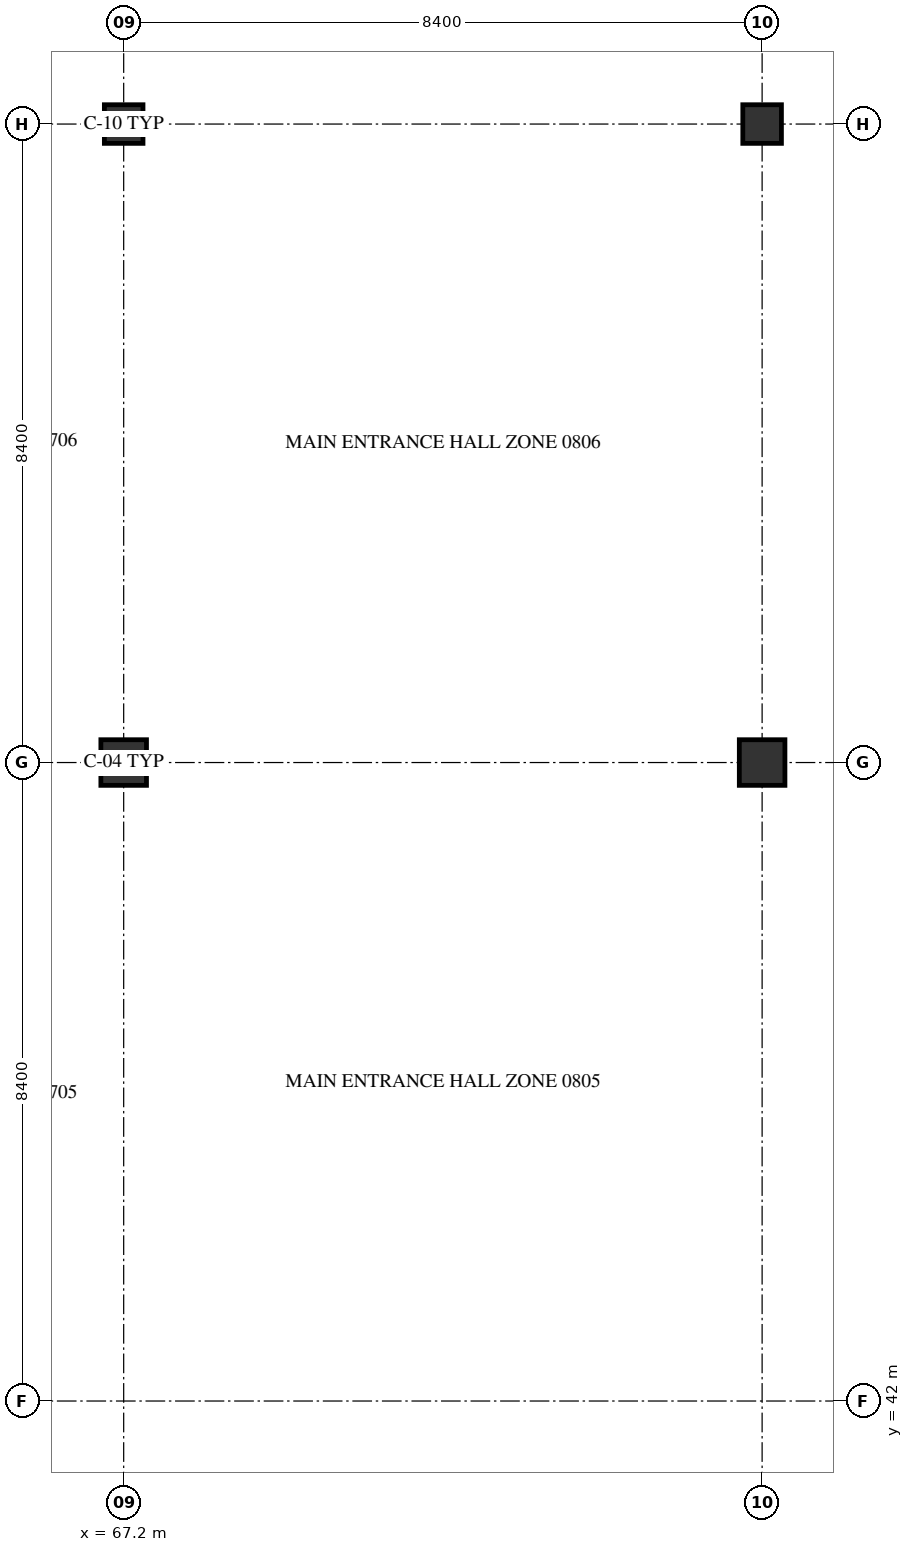
"""IFC4 building model, lengths in metres.
Left out: names, types, materials, properties, quantities, classifications, styles, units other than length and angle.
Written with IfcOpenShell. Run it as: python <this file> out.ifc"""

import sys

from ifc_helpers import new_model, si_unit, direction, frame, origin, origin_2d, place, context, subcontext, project, spatial, rectangle, hollow_circle, extrude, element, save


model = new_model("IFC4")
c1 = context("Model", 3, precision=1e-05, world=origin(), true_north=direction((0.0, 1.0)))
c2 = subcontext(c1, "Body", "Model", "MODEL_VIEW")
j1 = project(units=[si_unit("LENGTHUNIT", "METRE"), si_unit("PLANEANGLEUNIT", "RADIAN")], contexts=[c1])
p1 = place(None, origin())
s1 = spatial("IfcSite", under=j1, at=p1, CompositionType="ELEMENT")
p2 = place(p1, origin())
s2 = spatial("IfcBuilding", under=s1, at=p2, CompositionType="ELEMENT")
p3 = place(p2, origin())
s3 = spatial("IfcBuildingStorey", under=s2, at=p3, CompositionType="ELEMENT", Elevation=0.0)
p4 = place(p3, frame((67.2, 50.4, 0.0), z_axis=(0.0, 0.0, 1.0), x_axis=(1.0, 0.0, 0.0)))
e1 = element("IfcColumn", 1, at=p4, inside=s3, PredefinedType="COLUMN", context=c2, shape_type="SweptSolid", body=[
    extrude(rectangle(XDim=0.6, YDim=0.6, at=origin_2d()), origin(), (0.0, 0.0, 1.0), 4.8),
])
p5 = place(p3, frame((67.2, 58.8, 0.0), z_axis=(0.0, 0.0, 1.0), x_axis=(1.0, 0.0, 0.0)))
e2 = element("IfcColumn", 2, at=p5, inside=s3, PredefinedType="COLUMN", context=c2, shape_type="SweptSolid", body=[
    extrude(hollow_circle(Radius=0.254, WallThickness=0.02, at=origin_2d()), origin(), (0.0, 0.0, 1.0), 4.8),
])
p6 = place(p3, frame((75.6, 50.4, 0.0), z_axis=(0.0, 0.0, 1.0), x_axis=(1.0, 0.0, 0.0)))
e3 = element("IfcColumn", 3, at=p6, inside=s3, PredefinedType="COLUMN", context=c2, shape_type="SweptSolid", body=[
    extrude(rectangle(XDim=0.6, YDim=0.6, at=origin_2d()), origin(), (0.0, 0.0, 1.0), 4.8),
])
p7 = place(p3, frame((75.6, 58.8, 0.0), z_axis=(0.0, 0.0, 1.0), x_axis=(1.0, 0.0, 0.0)))
e4 = element("IfcColumn", 4, at=p7, inside=s3, PredefinedType="COLUMN", context=c2, shape_type="SweptSolid", body=[
    extrude(hollow_circle(Radius=0.254, WallThickness=0.02, at=origin_2d()), origin(), (0.0, 0.0, 1.0), 4.8),
])
save(model, sys.argv[1])
